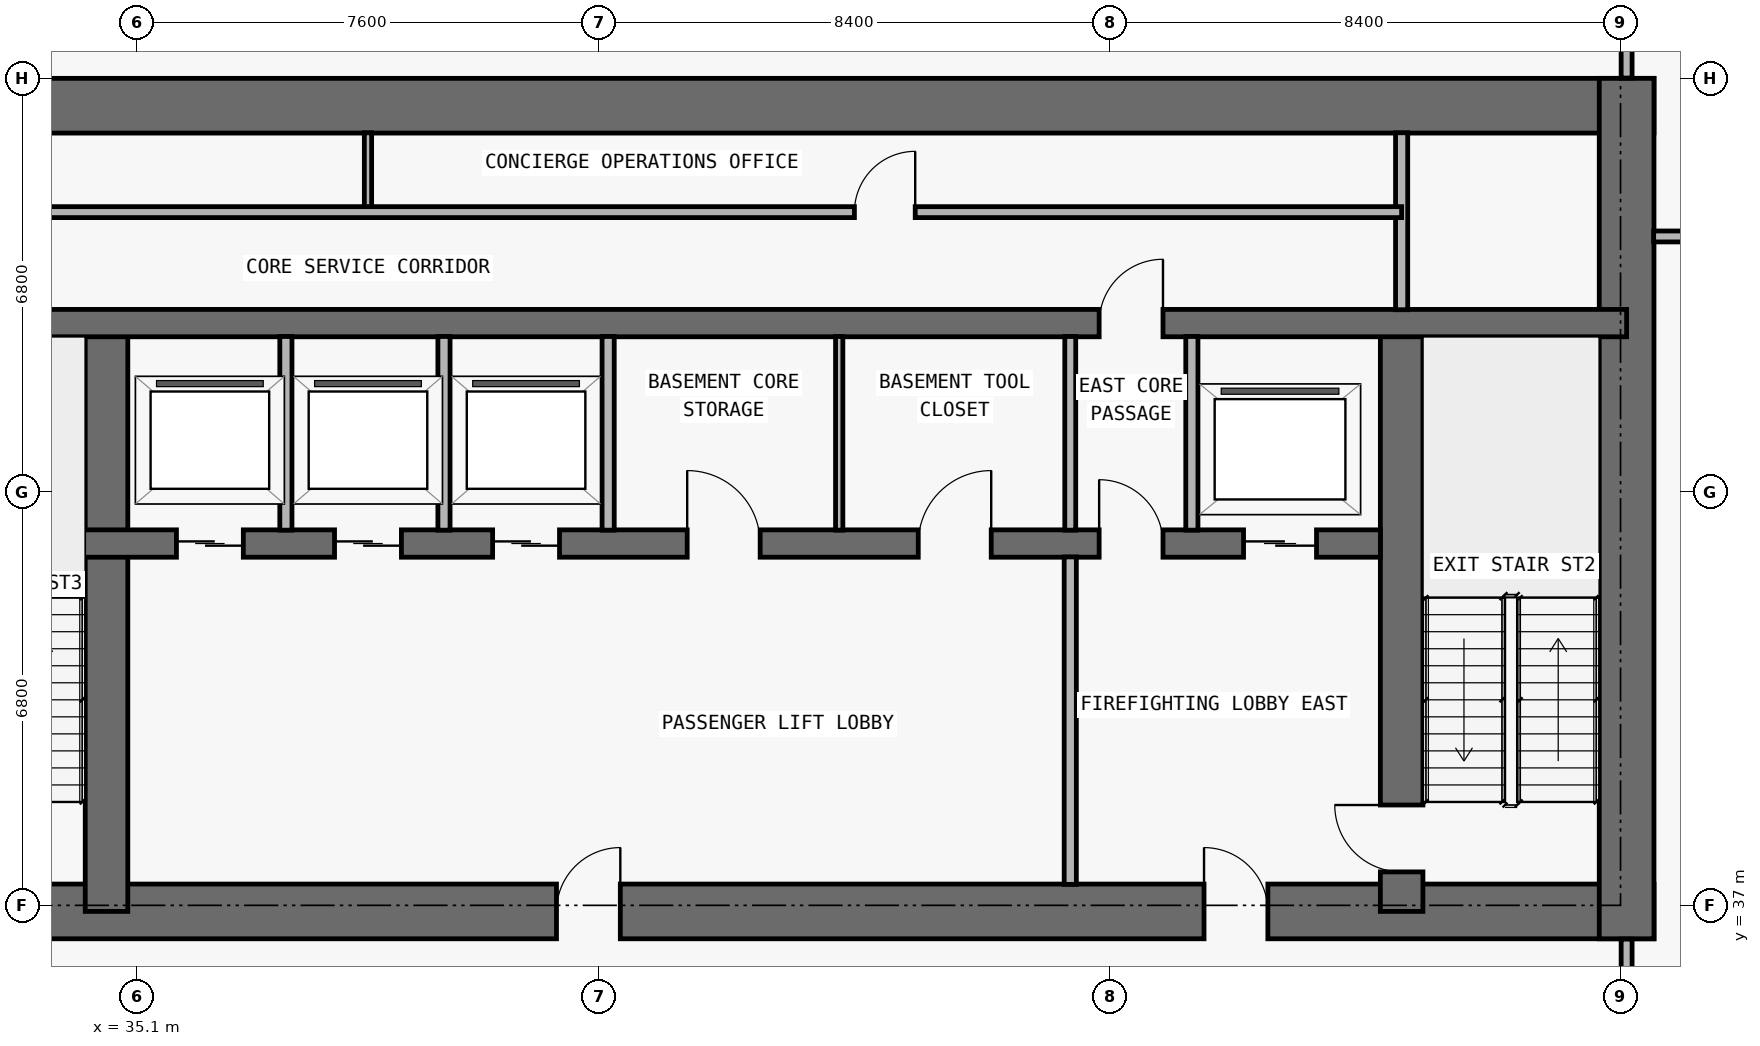
"""IFC4 building model, lengths in metres.
Left out: names, types, materials, properties, quantities, classifications, styles, units other than length and angle.
Written with IfcOpenShell. Run it as: python <this file> out.ifc"""

import sys

from ifc_helpers import new_model, si_unit, direction, frame, frame_2d, origin, place, context, subcontext, project, spatial, rectangle, extrude, element, fill, save


model = new_model("IFC4")
c1 = context("Model", 3, precision=1e-05, world=origin(), true_north=direction((0.0, 1.0)))
c2 = subcontext(c1, "Body", "Model", "MODEL_VIEW")
j1 = project(units=[si_unit("LENGTHUNIT", "METRE"), si_unit("PLANEANGLEUNIT", "RADIAN")], contexts=[c1])
p1 = place(None, origin())
s1 = spatial("IfcSite", under=j1, at=p1, CompositionType="ELEMENT")
p2 = place(p1, origin())
s2 = spatial("IfcBuilding", under=s1, at=p2, CompositionType="ELEMENT")
p3 = place(p2, frame((0.0, 0.0, -9.0)))
s3 = spatial("IfcBuildingStorey", under=s2, at=p3, CompositionType="ELEMENT", Elevation=-9.0)
p4 = place(p3, frame((17.75, 36.9, 0.0), z_axis=(0.0, 0.0, 1.0), x_axis=(1.0, 0.0, 0.0)))
e1 = element("IfcWall", 1, at=p4, inside=s3, PredefinedType="SHEAR", context=c2, shape_type="SweptSolid", body=[
    extrude(rectangle(XDim=42.3, YDim=0.9, at=frame_2d((21.15, 0.0))), origin(), (0.0, 0.0, 1.0), 4.2),
])
p5 = place(p4, frame((14.55, 0.0, 0.0)))
e2 = element("IfcOpeningElement", 2, at=p5, cuts=e1, PredefinedType="OPENING", context=c2, shape_type="SweptSolid", body=[
    extrude(rectangle(XDim=1.1, YDim=2.15, at=frame_2d((0.55, 1.075))), frame((0.0, 0.46, 0.0), z_axis=(0.0, -1.0, 0.0), x_axis=(1.0, 0.0, 0.0)), (0.0, 0.0, 1.0), 0.92),
])
p6 = place(p4, frame((6.4, 0.0, 0.0)))
e3 = element("IfcOpeningElement", 3, at=p6, cuts=e1, PredefinedType="OPENING", context=c2, shape_type="SweptSolid", body=[
    extrude(rectangle(XDim=1.05, YDim=2.15, at=frame_2d((0.525, 1.075))), frame((0.0, 0.46, 0.0), z_axis=(0.0, -1.0, 0.0), x_axis=(1.0, 0.0, 0.0)), (0.0, 0.0, 1.0), 0.92),
])
p7 = place(p4, frame((34.9, 0.0, 0.0)))
e4 = element("IfcOpeningElement", 4, at=p7, cuts=e1, PredefinedType="OPENING", context=c2, shape_type="SweptSolid", body=[
    extrude(rectangle(XDim=1.05, YDim=2.15, at=frame_2d((0.525, 1.075))), frame((0.0, 0.46, 0.0), z_axis=(0.0, -1.0, 0.0), x_axis=(1.0, 0.0, 0.0)), (0.0, 0.0, 1.0), 0.92),
])
p8 = place(p4, frame((11.012, 0.0, 0.0)))
e5 = element("IfcOpeningElement", 5, at=p8, cuts=e1, PredefinedType="OPENING", context=c2, shape_type="SweptSolid", body=[
    extrude(rectangle(XDim=1.05, YDim=2.15, at=frame_2d((0.525, 1.075))), frame((0.0, 0.46, 0.0), z_axis=(0.0, -1.0, 0.0), x_axis=(1.0, 0.0, 0.0)), (0.0, 0.0, 1.0), 0.92),
])
p9 = place(p4, frame((24.25, 0.0, 0.0)))
e6 = element("IfcOpeningElement", 6, at=p9, cuts=e1, PredefinedType="OPENING", context=c2, shape_type="SweptSolid", body=[
    extrude(rectangle(XDim=1.05, YDim=2.15, at=frame_2d((0.525, 1.075))), frame((0.0, 0.46, 0.0), z_axis=(0.0, -1.0, 0.0), x_axis=(1.0, 0.0, 0.0)), (0.0, 0.0, 1.0), 0.92),
])
p10 = place(p3, frame((17.75, 50.15, 0.0), z_axis=(0.0, 0.0, 1.0), x_axis=(1.0, 0.0, 0.0)))
e7 = element("IfcWall", 7, at=p10, inside=s3, PredefinedType="SHEAR", context=c2, shape_type="SweptSolid", body=[
    extrude(rectangle(XDim=42.3, YDim=0.9, at=frame_2d((21.15, 0.0))), origin(), (0.0, 0.0, 1.0), 4.2),
])
p11 = place(p3, frame((59.6, 36.45, 0.0), z_axis=(0.0, 0.0, 1.0), x_axis=(0.0, 1.0, 0.0)))
e8 = element("IfcWall", 8, at=p11, inside=s3, PredefinedType="SHEAR", context=c2, shape_type="SweptSolid", body=[
    extrude(rectangle(XDim=14.15, YDim=0.9, at=frame_2d((7.075, 0.0))), origin(), (0.0, 0.0, 1.0), 4.2),
])
p12 = place(p3, frame((55.9, 36.9, 0.0), z_axis=(0.0, 0.0, 1.0), x_axis=(0.0, 1.0, 0.0)))
e9 = element("IfcWall", 9, at=p12, inside=s3, PredefinedType="SHEAR", context=c2, shape_type="SweptSolid", body=[
    extrude(rectangle(XDim=9.675, YDim=0.7, at=frame_2d((4.837, 0.0))), origin(), (0.0, 0.0, 1.0), 4.2),
])
p13 = place(p12, frame((0.65, 0.0, 0.0)))
e10 = element("IfcOpeningElement", 10, at=p13, cuts=e9, PredefinedType="OPENING", context=c2, shape_type="SweptSolid", body=[
    extrude(rectangle(XDim=1.1, YDim=2.15, at=frame_2d((0.55, 1.075))), frame((0.0, 0.36, 0.0), z_axis=(0.0, -1.0, 0.0), x_axis=(1.0, 0.0, 0.0)), (0.0, 0.0, 1.0), 0.72),
])
p14 = place(p3, frame((34.6, 36.9, 0.0), z_axis=(0.0, 0.0, 1.0), x_axis=(0.0, 1.0, 0.0)))
e11 = element("IfcWall", 11, at=p14, inside=s3, PredefinedType="SHEAR", context=c2, shape_type="SweptSolid", body=[
    extrude(rectangle(XDim=9.675, YDim=0.7, at=frame_2d((4.837, 0.0))), origin(), (0.0, 0.0, 1.0), 4.2),
])
p15 = place(p3, frame((22.25, 42.95, 0.0), z_axis=(0.0, 0.0, 1.0), x_axis=(1.0, 0.0, 0.0)))
e12 = element("IfcWall", 12, at=p15, inside=s3, PredefinedType="SHEAR", context=c2, shape_type="SweptSolid", body=[
    extrude(rectangle(XDim=33.3, YDim=0.45, at=frame_2d((16.65, 0.0))), origin(), (0.0, 0.0, 1.0), 4.2),
])
p16 = place(p15, frame((1.05, 0.0, 0.0)))
e13 = element("IfcOpeningElement", 13, at=p16, cuts=e12, PredefinedType="OPENING", context=c2, shape_type="SweptSolid", body=[
    extrude(rectangle(XDim=1.2, YDim=2.2, at=frame_2d((0.6, 1.1))), frame((0.0, 0.235, 0.0), z_axis=(0.0, -1.0, 0.0), x_axis=(1.0, 0.0, 0.0)), (0.0, 0.0, 1.0), 0.47),
])
p17 = place(p15, frame((31.05, 0.0, 0.0)))
e14 = element("IfcOpeningElement", 14, at=p17, cuts=e12, PredefinedType="OPENING", context=c2, shape_type="SweptSolid", body=[
    extrude(rectangle(XDim=1.2, YDim=2.2, at=frame_2d((0.6, 1.1))), frame((0.0, 0.235, 0.0), z_axis=(0.0, -1.0, 0.0), x_axis=(1.0, 0.0, 0.0)), (0.0, 0.0, 1.0), 0.47),
])
p18 = place(p15, frame((13.5, 0.0, 0.0)))
e15 = element("IfcOpeningElement", 15, at=p18, cuts=e12, PredefinedType="OPENING", context=c2, shape_type="SweptSolid", body=[
    extrude(rectangle(XDim=1.1, YDim=2.2, at=frame_2d((0.55, 1.1))), frame((0.0, 0.235, 0.0), z_axis=(0.0, -1.0, 0.0), x_axis=(1.0, 0.0, 0.0)), (0.0, 0.0, 1.0), 0.47),
])
p19 = place(p15, frame((16.1, 0.0, 0.0)))
e16 = element("IfcOpeningElement", 16, at=p19, cuts=e12, PredefinedType="OPENING", context=c2, shape_type="SweptSolid", body=[
    extrude(rectangle(XDim=1.1, YDim=2.2, at=frame_2d((0.55, 1.1))), frame((0.0, 0.235, 0.0), z_axis=(0.0, -1.0, 0.0), x_axis=(1.0, 0.0, 0.0)), (0.0, 0.0, 1.0), 0.47),
])
p20 = place(p15, frame((18.7, 0.0, 0.0)))
e17 = element("IfcOpeningElement", 17, at=p20, cuts=e12, PredefinedType="OPENING", context=c2, shape_type="SweptSolid", body=[
    extrude(rectangle(XDim=1.1, YDim=2.2, at=frame_2d((0.55, 1.1))), frame((0.0, 0.235, 0.0), z_axis=(0.0, -1.0, 0.0), x_axis=(1.0, 0.0, 0.0)), (0.0, 0.0, 1.0), 0.47),
])
p21 = place(p15, frame((3.625, 0.0, 0.0)))
e18 = element("IfcOpeningElement", 18, at=p21, cuts=e12, PredefinedType="OPENING", context=c2, shape_type="SweptSolid", body=[
    extrude(rectangle(XDim=1.05, YDim=2.15, at=frame_2d((0.525, 1.075))), frame((0.0, 0.235, 0.0), z_axis=(0.0, -1.0, 0.0), x_axis=(1.0, 0.0, 0.0)), (0.0, 0.0, 1.0), 0.47),
])
p22 = place(p15, frame((28.675, 0.0, 0.0)))
e19 = element("IfcOpeningElement", 19, at=p22, cuts=e12, PredefinedType="OPENING", context=c2, shape_type="SweptSolid", body=[
    extrude(rectangle(XDim=1.05, YDim=2.15, at=frame_2d((0.525, 1.075))), frame((0.0, 0.235, 0.0), z_axis=(0.0, -1.0, 0.0), x_axis=(1.0, 0.0, 0.0)), (0.0, 0.0, 1.0), 0.47),
])
p23 = place(p15, frame((6.538, 0.0, 0.0)))
e20 = element("IfcOpeningElement", 20, at=p23, cuts=e12, PredefinedType="OPENING", context=c2, shape_type="SweptSolid", body=[
    extrude(rectangle(XDim=1.0, YDim=2.2, at=frame_2d((0.5, 1.1))), frame((0.0, 0.235, 0.0), z_axis=(0.0, -1.0, 0.0), x_axis=(1.0, 0.0, 0.0)), (0.0, 0.0, 1.0), 0.47),
])
p24 = place(p15, frame((21.9, 0.0, 0.0)))
e21 = element("IfcOpeningElement", 21, at=p24, cuts=e12, PredefinedType="OPENING", context=c2, shape_type="SweptSolid", body=[
    extrude(rectangle(XDim=1.2, YDim=2.2, at=frame_2d((0.6, 1.1))), frame((0.0, 0.235, 0.0), z_axis=(0.0, -1.0, 0.0), x_axis=(1.0, 0.0, 0.0)), (0.0, 0.0, 1.0), 0.47),
])
p25 = place(p15, frame((25.7, 0.0, 0.0)))
e22 = element("IfcOpeningElement", 22, at=p25, cuts=e12, PredefinedType="OPENING", context=c2, shape_type="SweptSolid", body=[
    extrude(rectangle(XDim=1.2, YDim=2.2, at=frame_2d((0.6, 1.1))), frame((0.0, 0.235, 0.0), z_axis=(0.0, -1.0, 0.0), x_axis=(1.0, 0.0, 0.0)), (0.0, 0.0, 1.0), 0.47),
])
p26 = place(p3, frame((18.2, 46.575, 0.0), z_axis=(0.0, 0.0, 1.0), x_axis=(1.0, 0.0, 0.0)))
e23 = element("IfcWall", 23, at=p26, inside=s3, PredefinedType="SHEAR", context=c2, shape_type="SweptSolid", body=[
    extrude(rectangle(XDim=41.4, YDim=0.45, at=frame_2d((20.7, 0.0))), origin(), (0.0, 0.0, 1.0), 4.2),
])
p27 = place(p26, frame((7.675, 0.0, 0.0)))
e24 = element("IfcOpeningElement", 24, at=p27, cuts=e23, PredefinedType="OPENING", context=c2, shape_type="SweptSolid", body=[
    extrude(rectangle(XDim=1.05, YDim=2.15, at=frame_2d((0.525, 1.075))), frame((0.0, 0.235, 0.0), z_axis=(0.0, -1.0, 0.0), x_axis=(1.0, 0.0, 0.0)), (0.0, 0.0, 1.0), 0.47),
])
p28 = place(p26, frame((32.725, 0.0, 0.0)))
e25 = element("IfcOpeningElement", 25, at=p28, cuts=e23, PredefinedType="OPENING", context=c2, shape_type="SweptSolid", body=[
    extrude(rectangle(XDim=1.05, YDim=2.15, at=frame_2d((0.525, 1.075))), frame((0.0, 0.235, 0.0), z_axis=(0.0, -1.0, 0.0), x_axis=(1.0, 0.0, 0.0)), (0.0, 0.0, 1.0), 0.47),
])
p29 = place(p3, frame((37.55, 43.17, 0.0), z_axis=(0.0, 0.0, 1.0), x_axis=(0.0, 1.0, 0.0)))
e26 = element("IfcWall", 26, at=p29, inside=s3, PredefinedType="PARTITIONING", context=c2, shape_type="SweptSolid", body=[
    extrude(rectangle(XDim=3.185, YDim=0.2, at=frame_2d((1.593, 0.0))), origin(), (0.0, 0.0, 1.0), 4.2),
])
p30 = place(p3, frame((38.9, 48.4, 0.0), z_axis=(0.0, 0.0, 1.0), x_axis=(0.0, 1.0, 0.0)))
e27 = element("IfcWall", 27, at=p30, inside=s3, PredefinedType="PARTITIONING", context=c2, shape_type="SweptSolid", body=[
    extrude(rectangle(XDim=1.305, YDim=0.12, at=frame_2d((0.653, 0.0))), origin(), (0.0, 0.0, 1.0), 4.2),
])
for number, where, z_axis, x_axis in (
    (28, (40.15, 43.17, 0.0), (0.0, 0.0, 1.0), (0.0, 1.0, 0.0)),
    (29, (42.85, 43.17, 0.0), (0.0, 0.0, 1.0), (0.0, 1.0, 0.0)),
):
    element("IfcWall", number, at=place(p3, frame(where, z_axis=z_axis, x_axis=x_axis)), inside=s3, PredefinedType="PARTITIONING", context=c2, shape_type="SweptSolid", body=[
        extrude(rectangle(XDim=3.185, YDim=0.2, at=frame_2d((1.593, 0.0))), origin(), (0.0, 0.0, 1.0), 4.2),
    ])
p31 = place(p3, frame((46.65, 43.17, 0.0), z_axis=(0.0, 0.0, 1.0), x_axis=(0.0, 1.0, 0.0)))
e30 = element("IfcWall", 30, at=p31, inside=s3, PredefinedType="PARTITIONING", context=c2, shape_type="SweptSolid", body=[
    extrude(rectangle(XDim=3.185, YDim=0.12, at=frame_2d((1.593, 0.0))), origin(), (0.0, 0.0, 1.0), 4.2),
])
p32 = place(p3, frame((50.45, 37.345, 0.0), z_axis=(0.0, 0.0, 1.0), x_axis=(0.0, 1.0, 0.0)))
e31 = element("IfcWall", 31, at=p32, inside=s3, PredefinedType="PARTITIONING", context=c2, shape_type="SweptSolid", body=[
    extrude(rectangle(XDim=5.385, YDim=0.2, at=frame_2d((2.692, 0.0))), origin(), (0.0, 0.0, 1.0), 4.2),
])
p33 = place(p3, frame((50.45, 43.17, 0.0), z_axis=(0.0, 0.0, 1.0), x_axis=(0.0, 1.0, 0.0)))
e32 = element("IfcWall", 32, at=p33, inside=s3, PredefinedType="PARTITIONING", context=c2, shape_type="SweptSolid", body=[
    extrude(rectangle(XDim=3.185, YDim=0.18, at=frame_2d((1.593, 0.0))), origin(), (0.0, 0.0, 1.0), 4.2),
])
p34 = place(p3, frame((52.45, 43.17, 0.0), z_axis=(0.0, 0.0, 1.0), x_axis=(0.0, 1.0, 0.0)))
e33 = element("IfcWall", 33, at=p34, inside=s3, PredefinedType="PARTITIONING", context=c2, shape_type="SweptSolid", body=[
    extrude(rectangle(XDim=3.185, YDim=0.2, at=frame_2d((1.593, 0.0))), origin(), (0.0, 0.0, 1.0), 4.2),
])
p35 = place(p3, frame((55.9, 46.795, 0.0), z_axis=(0.0, 0.0, 1.0), x_axis=(0.0, 1.0, 0.0)))
e34 = element("IfcWall", 34, at=p35, inside=s3, PredefinedType="PARTITIONING", context=c2, shape_type="SweptSolid", body=[
    extrude(rectangle(XDim=2.91, YDim=0.2, at=frame_2d((1.455, 0.0))), origin(), (0.0, 0.0, 1.0), 4.2),
])
p36 = place(p3, frame((59.6, 34.4, 0.0), z_axis=(0.0, 0.0, 1.0), x_axis=(0.0, 1.0, 0.0)))
e35 = element("IfcWall", 35, at=p36, inside=s3, PredefinedType="PARTITIONING", context=c2, shape_type="SweptSolid", body=[
    extrude(rectangle(XDim=2.045, YDim=0.18, at=frame_2d((1.022, 0.0))), origin(), (0.0, 0.0, 1.0), 3.085),
])
p37 = place(p3, frame((59.6, 50.605, 0.0), z_axis=(0.0, 0.0, 1.0), x_axis=(0.0, 1.0, 0.0)))
e36 = element("IfcWall", 36, at=p37, inside=s3, PredefinedType="PARTITIONING", context=c2, shape_type="SweptSolid", body=[
    extrude(rectangle(XDim=2.195, YDim=0.18, at=frame_2d((1.098, 0.0))), origin(), (0.0, 0.0, 1.0), 4.2),
])
p38 = place(p3, frame((60.045, 48.0, 0.0), z_axis=(0.0, 0.0, 1.0), x_axis=(1.0, 0.0, 0.0)))
e37 = element("IfcWall", 37, at=p38, inside=s3, PredefinedType="PARTITIONING", context=c2, shape_type="SweptSolid", body=[
    extrude(rectangle(XDim=9.6, YDim=0.18, at=frame_2d((4.8, 0.0))), origin(), (0.0, 0.0, 1.0), 4.2),
])
p39 = place(p38, frame((2.302, 0.0, 0.0)))
e38 = element("IfcOpeningElement", 38, at=p39, cuts=e37, PredefinedType="OPENING", context=c2, shape_type="SweptSolid", body=[
    extrude(rectangle(XDim=0.85, YDim=2.1, at=frame_2d((0.425, 1.05))), frame((0.0, 0.1, 0.0), z_axis=(0.0, -1.0, 0.0), x_axis=(1.0, 0.0, 0.0)), (0.0, 0.0, 1.0), 0.2),
])
p40 = place(p3, frame((21.9, 48.4, 0.0), z_axis=(0.0, 0.0, 1.0), x_axis=(1.0, 0.0, 0.0)))
e39 = element("IfcWall", 39, at=p40, inside=s3, PredefinedType="PARTITIONING", context=c2, shape_type="SweptSolid", body=[
    extrude(rectangle(XDim=34.0, YDim=0.18, at=frame_2d((17.0, 0.0))), origin(), (0.0, 0.0, 1.0), 4.2),
])
p41 = place(p40, frame((8.0, 0.0, 0.0)))
e40 = element("IfcOpeningElement", 40, at=p41, cuts=e39, PredefinedType="OPENING", context=c2, shape_type="SweptSolid", body=[
    extrude(rectangle(XDim=1.0, YDim=2.2, at=frame_2d((0.5, 1.1))), frame((0.0, 0.1, 0.0), z_axis=(0.0, -1.0, 0.0), x_axis=(1.0, 0.0, 0.0)), (0.0, 0.0, 1.0), 0.2),
])
p42 = place(p40, frame((25.0, 0.0, 0.0)))
e41 = element("IfcOpeningElement", 41, at=p42, cuts=e39, PredefinedType="OPENING", context=c2, shape_type="SweptSolid", body=[
    extrude(rectangle(XDim=1.0, YDim=2.2, at=frame_2d((0.5, 1.1))), frame((0.0, 0.1, 0.0), z_axis=(0.0, -1.0, 0.0), x_axis=(1.0, 0.0, 0.0)), (0.0, 0.0, 1.0), 0.2),
])
p43 = place(p17, origin())
e42 = element("IfcDoor", 42, at=p43, inside=s3, OperationType="DOUBLE_DOOR_SLIDING", PredefinedType="DOOR", context=c2, shape_type="SweptSolid", body=[
    extrude(rectangle(XDim=1.2, YDim=2.2, at=frame_2d((0.6, 1.1))), frame((0.0, 0.025, 0.0), z_axis=(0.0, -1.0, 0.0), x_axis=(1.0, 0.0, 0.0)), (0.0, 0.0, 1.0), 0.05),
])
fill(e14, e42)
p44 = place(p18, origin())
e43 = element("IfcDoor", 43, at=p44, inside=s3, OperationType="DOUBLE_DOOR_SLIDING", PredefinedType="DOOR", context=c2, shape_type="SweptSolid", body=[
    extrude(rectangle(XDim=1.1, YDim=2.2, at=frame_2d((0.55, 1.1))), frame((0.0, 0.025, 0.0), z_axis=(0.0, -1.0, 0.0), x_axis=(1.0, 0.0, 0.0)), (0.0, 0.0, 1.0), 0.05),
])
fill(e15, e43)
p45 = place(p19, origin())
e44 = element("IfcDoor", 44, at=p45, inside=s3, OperationType="DOUBLE_DOOR_SLIDING", PredefinedType="DOOR", context=c2, shape_type="SweptSolid", body=[
    extrude(rectangle(XDim=1.1, YDim=2.2, at=frame_2d((0.55, 1.1))), frame((0.0, 0.025, 0.0), z_axis=(0.0, -1.0, 0.0), x_axis=(1.0, 0.0, 0.0)), (0.0, 0.0, 1.0), 0.05),
])
fill(e16, e44)
p46 = place(p20, origin())
e45 = element("IfcDoor", 45, at=p46, inside=s3, OperationType="DOUBLE_DOOR_SLIDING", PredefinedType="DOOR", context=c2, shape_type="SweptSolid", body=[
    extrude(rectangle(XDim=1.1, YDim=2.2, at=frame_2d((0.55, 1.1))), frame((0.0, 0.025, 0.0), z_axis=(0.0, -1.0, 0.0), x_axis=(1.0, 0.0, 0.0)), (0.0, 0.0, 1.0), 0.05),
])
fill(e17, e45)
p47 = place(p7, origin())
e46 = element("IfcDoor", 46, at=p47, inside=s3, OperationType="SINGLE_SWING_LEFT", PredefinedType="DOOR", context=c2, shape_type="SweptSolid", body=[
    extrude(rectangle(XDim=1.05, YDim=2.15, at=frame_2d((0.525, 1.075))), frame((0.0, 0.025, 0.0), z_axis=(0.0, -1.0, 0.0), x_axis=(1.0, 0.0, 0.0)), (0.0, 0.0, 1.0), 0.05),
])
fill(e4, e46)
p48 = place(p13, origin())
e47 = element("IfcDoor", 47, at=p48, inside=s3, OperationType="SINGLE_SWING_RIGHT", PredefinedType="DOOR", context=c2, shape_type="SweptSolid", body=[
    extrude(rectangle(XDim=1.1, YDim=2.15, at=frame_2d((0.55, 1.075))), frame((0.0, 0.025, 0.0), z_axis=(0.0, -1.0, 0.0), x_axis=(1.0, 0.0, 0.0)), (0.0, 0.0, 1.0), 0.05),
])
fill(e10, e47)
p49 = place(p22, origin())
e48 = element("IfcDoor", 48, at=p49, inside=s3, OperationType="SINGLE_SWING_LEFT", PredefinedType="DOOR", context=c2, shape_type="SweptSolid", body=[
    extrude(rectangle(XDim=1.05, YDim=2.15, at=frame_2d((0.525, 1.075))), frame((0.0, 0.025, 0.0), z_axis=(0.0, -1.0, 0.0), x_axis=(1.0, 0.0, 0.0)), (0.0, 0.0, 1.0), 0.05),
])
fill(e19, e48)
p50 = place(p9, origin())
e49 = element("IfcDoor", 49, at=p50, inside=s3, OperationType="SINGLE_SWING_RIGHT", PredefinedType="DOOR", context=c2, shape_type="SweptSolid", body=[
    extrude(rectangle(XDim=1.05, YDim=2.15, at=frame_2d((0.525, 1.075))), frame((0.0, 0.025, 0.0), z_axis=(0.0, -1.0, 0.0), x_axis=(1.0, 0.0, 0.0)), (0.0, 0.0, 1.0), 0.05),
])
fill(e6, e49)
p51 = place(p24, origin())
e50 = element("IfcDoor", 50, at=p51, inside=s3, OperationType="SINGLE_SWING_LEFT", PredefinedType="DOOR", context=c2, shape_type="SweptSolid", body=[
    extrude(rectangle(XDim=1.2, YDim=2.2, at=frame_2d((0.6, 1.1))), frame((0.0, 0.025, 0.0), z_axis=(0.0, -1.0, 0.0), x_axis=(1.0, 0.0, 0.0)), (0.0, 0.0, 1.0), 0.05),
])
fill(e21, e50)
p52 = place(p25, origin())
e51 = element("IfcDoor", 51, at=p52, inside=s3, OperationType="SINGLE_SWING_RIGHT", PredefinedType="DOOR", context=c2, shape_type="SweptSolid", body=[
    extrude(rectangle(XDim=1.2, YDim=2.2, at=frame_2d((0.6, 1.1))), frame((0.0, 0.025, 0.0), z_axis=(0.0, -1.0, 0.0), x_axis=(1.0, 0.0, 0.0)), (0.0, 0.0, 1.0), 0.05),
])
fill(e22, e51)
p53 = place(p28, origin())
e52 = element("IfcDoor", 52, at=p53, inside=s3, OperationType="SINGLE_SWING_RIGHT", PredefinedType="DOOR", context=c2, shape_type="SweptSolid", body=[
    extrude(rectangle(XDim=1.05, YDim=2.15, at=frame_2d((0.525, 1.075))), frame((0.0, 0.025, 0.0), z_axis=(0.0, -1.0, 0.0), x_axis=(1.0, 0.0, 0.0)), (0.0, 0.0, 1.0), 0.05),
])
fill(e25, e52)
p54 = place(p42, origin())
e53 = element("IfcDoor", 53, at=p54, inside=s3, OperationType="SINGLE_SWING_RIGHT", PredefinedType="DOOR", context=c2, shape_type="SweptSolid", body=[
    extrude(rectangle(XDim=1.0, YDim=2.2, at=frame_2d((0.5, 1.1))), frame((0.0, 0.025, 0.0), z_axis=(0.0, -1.0, 0.0), x_axis=(1.0, 0.0, 0.0)), (0.0, 0.0, 1.0), 0.05),
])
fill(e41, e53)
save(model, sys.argv[1])
